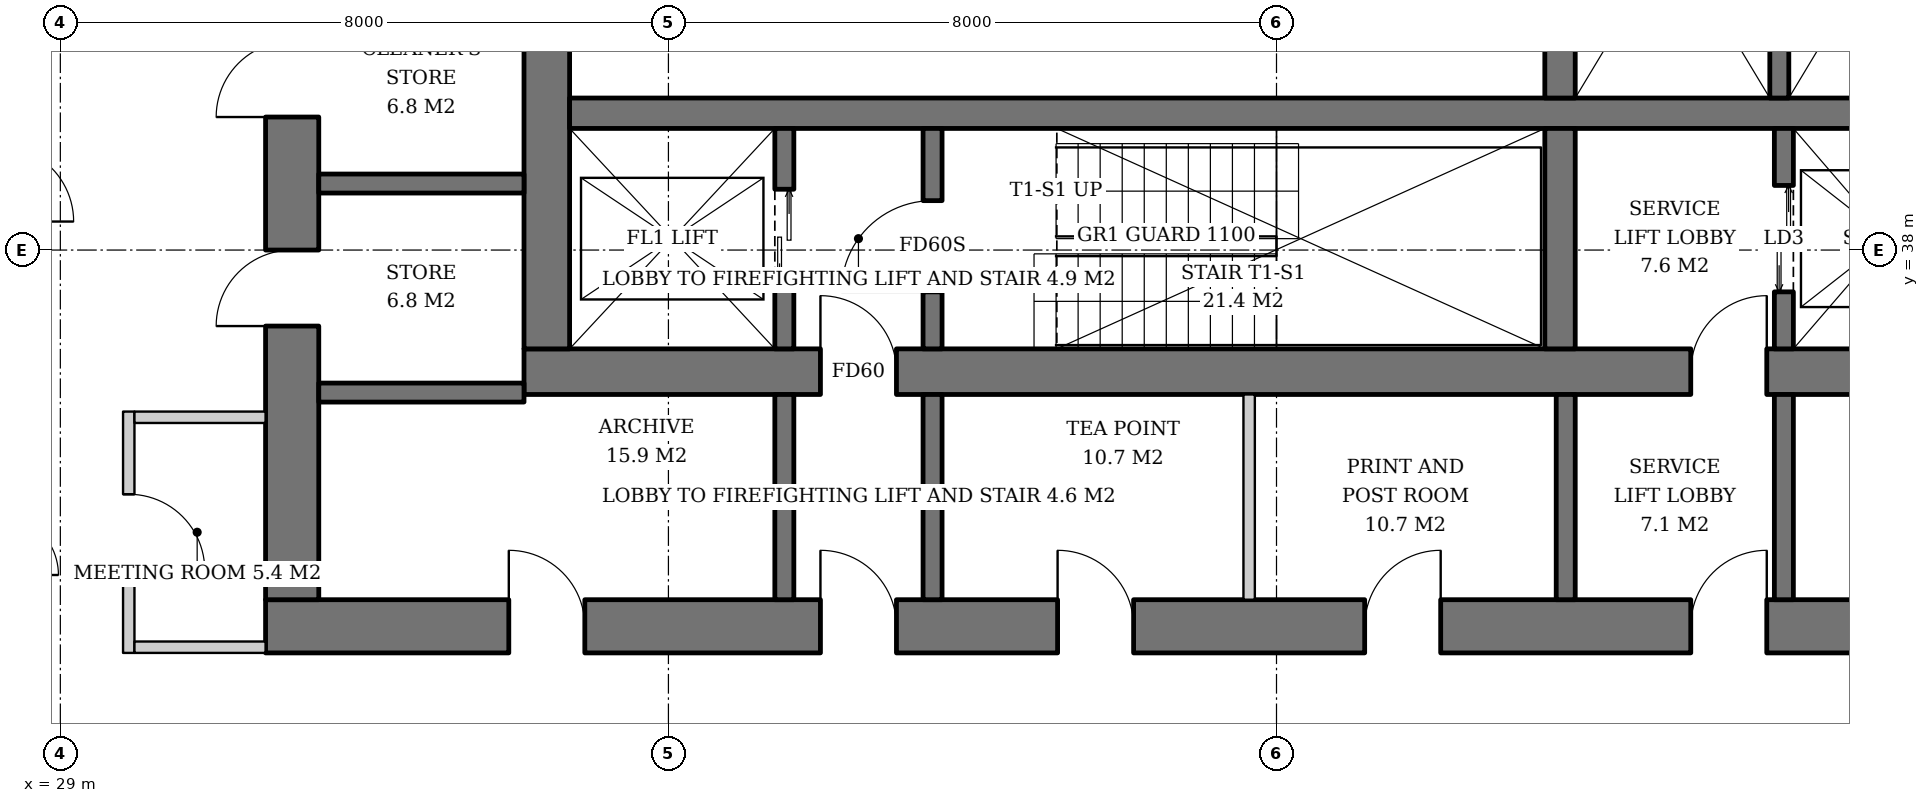
"""IFC4 building model, lengths in metres.
Left out: names, types, materials, properties, quantities, classifications, styles, units other than length and angle.
Written with IfcOpenShell. Run it as: python <this file> out.ifc"""

import sys

from ifc_helpers import new_model, si_unit, direction, frame, frame_2d, origin, place, context, subcontext, project, spatial, rectangle, extrude, element, fill, save


model = new_model("IFC4")
c1 = context("Model", 3, precision=1e-05, world=origin(), true_north=direction((0.0, 1.0)))
c2 = subcontext(c1, "Body", "Model", "MODEL_VIEW")
j1 = project(units=[si_unit("LENGTHUNIT", "METRE"), si_unit("PLANEANGLEUNIT", "RADIAN")], contexts=[c1])
p1 = place(None, origin())
s1 = spatial("IfcSite", under=j1, at=p1, CompositionType="ELEMENT")
p2 = place(p1, origin())
s2 = spatial("IfcBuilding", under=s1, at=p2, CompositionType="ELEMENT")
p3 = place(p2, frame((0.0, 0.0, 123.6)))
s3 = spatial("IfcBuildingStorey", under=s2, at=p3, CompositionType="ELEMENT", Elevation=123.6)
p4 = place(p3, frame((35.1, 36.4, 0.0), z_axis=(0.0, 0.0, 1.0), x_axis=(1.0, 0.0, 0.0)))
e1 = element("IfcWall", 1, at=p4, inside=s3, PredefinedType="SHEAR", context=c2, shape_type="SweptSolid", body=[
    extrude(rectangle(XDim=19.8, YDim=0.6, at=frame_2d((9.9, 0.0))), origin(), (0.0, 0.0, 1.0), 3.8),
])
p5 = place(p4, frame((3.9, 0.0, 0.0)))
e2 = element("IfcOpeningElement", 2, at=p5, cuts=e1, PredefinedType="OPENING", context=c2, shape_type="SweptSolid", body=[
    extrude(rectangle(XDim=1.0, YDim=2.1, at=frame_2d((0.5, 1.05))), frame((0.0, 0.31, 0.0), z_axis=(0.0, -1.0, 0.0), x_axis=(1.0, 0.0, 0.0)), (0.0, 0.0, 1.0), 0.62),
])
p6 = place(p4, frame((15.35, 0.0, 0.0)))
e3 = element("IfcOpeningElement", 3, at=p6, cuts=e1, PredefinedType="OPENING", context=c2, shape_type="SweptSolid", body=[
    extrude(rectangle(XDim=1.0, YDim=2.1, at=frame_2d((0.5, 1.05))), frame((0.0, 0.31, 0.0), z_axis=(0.0, -1.0, 0.0), x_axis=(1.0, 0.0, 0.0)), (0.0, 0.0, 1.0), 0.62),
])
p7 = place(p3, frame((35.4, 36.7, 0.0), z_axis=(0.0, 0.0, 1.0), x_axis=(0.0, 1.0, 0.0)))
e4 = element("IfcWall", 4, at=p7, inside=s3, PredefinedType="SHEAR", context=c2, shape_type="SweptSolid", body=[
    extrude(rectangle(XDim=18.6, YDim=0.6, at=frame_2d((9.3, 0.0))), origin(), (0.0, 0.0, 1.0), 3.8),
])
p8 = place(p7, frame((8.4, 0.0, 0.0)))
e5 = element("IfcOpeningElement", 5, at=p8, cuts=e4, PredefinedType="OPENING", context=c2, shape_type="SweptSolid", body=[
    extrude(rectangle(XDim=1.8, YDim=2.4, at=frame_2d((0.9, 1.2))), frame((0.0, 0.31, 0.0), z_axis=(0.0, -1.0, 0.0), x_axis=(1.0, 0.0, 0.0)), (0.0, 0.0, 1.0), 0.62),
])
p9 = place(p3, frame((31.7, 33.05, 0.0), z_axis=(0.0, 0.0, 1.0), x_axis=(1.0, 0.0, 0.0)))
e6 = element("IfcWall", 6, at=p9, inside=s3, PredefinedType="SHEAR", context=c2, shape_type="SweptSolid", body=[
    extrude(rectangle(XDim=26.6, YDim=0.7, at=frame_2d((13.3, 0.0))), origin(), (0.0, 0.0, 1.0), 3.8),
])
p10 = place(p9, frame((7.3, 0.0, 0.0)))
e7 = element("IfcOpeningElement", 7, at=p10, cuts=e6, PredefinedType="OPENING", context=c2, shape_type="SweptSolid", body=[
    extrude(rectangle(XDim=1.0, YDim=2.1, at=frame_2d((0.5, 1.05))), frame((0.0, 0.36, 0.0), z_axis=(0.0, -1.0, 0.0), x_axis=(1.0, 0.0, 0.0)), (0.0, 0.0, 1.0), 0.72),
])
p11 = place(p9, frame((18.75, 0.0, 0.0)))
e8 = element("IfcOpeningElement", 8, at=p11, cuts=e6, PredefinedType="OPENING", context=c2, shape_type="SweptSolid", body=[
    extrude(rectangle(XDim=1.0, YDim=2.1, at=frame_2d((0.5, 1.05))), frame((0.0, 0.36, 0.0), z_axis=(0.0, -1.0, 0.0), x_axis=(1.0, 0.0, 0.0)), (0.0, 0.0, 1.0), 0.72),
])
p12 = place(p9, frame((3.2, 0.0, 0.0)))
e9 = element("IfcOpeningElement", 9, at=p12, cuts=e6, PredefinedType="OPENING", context=c2, shape_type="SweptSolid", body=[
    extrude(rectangle(XDim=1.0, YDim=2.1, at=frame_2d((0.5, 1.05))), frame((0.0, 0.36, 0.0), z_axis=(0.0, -1.0, 0.0), x_axis=(1.0, 0.0, 0.0)), (0.0, 0.0, 1.0), 0.72),
])
p13 = place(p9, frame((10.42, 0.0, 0.0)))
e10 = element("IfcOpeningElement", 10, at=p13, cuts=e6, PredefinedType="OPENING", context=c2, shape_type="SweptSolid", body=[
    extrude(rectangle(XDim=1.0, YDim=2.1, at=frame_2d((0.5, 1.05))), frame((0.0, 0.36, 0.0), z_axis=(0.0, -1.0, 0.0), x_axis=(1.0, 0.0, 0.0)), (0.0, 0.0, 1.0), 0.72),
])
p14 = place(p9, frame((14.46, 0.0, 0.0)))
e11 = element("IfcOpeningElement", 11, at=p14, cuts=e6, PredefinedType="OPENING", context=c2, shape_type="SweptSolid", body=[
    extrude(rectangle(XDim=1.0, YDim=2.1, at=frame_2d((0.5, 1.05))), frame((0.0, 0.36, 0.0), z_axis=(0.0, -1.0, 0.0), x_axis=(1.0, 0.0, 0.0)), (0.0, 0.0, 1.0), 0.72),
])
p15 = place(p9, frame((22.5, 0.0, 0.0)))
e12 = element("IfcOpeningElement", 12, at=p15, cuts=e6, PredefinedType="OPENING", context=c2, shape_type="SweptSolid", body=[
    extrude(rectangle(XDim=1.0, YDim=2.1, at=frame_2d((0.5, 1.05))), frame((0.0, 0.36, 0.0), z_axis=(0.0, -1.0, 0.0), x_axis=(1.0, 0.0, 0.0)), (0.0, 0.0, 1.0), 0.72),
])
p16 = place(p3, frame((32.05, 33.4, 0.0), z_axis=(0.0, 0.0, 1.0), x_axis=(0.0, 1.0, 0.0)))
e13 = element("IfcWall", 13, at=p16, inside=s3, PredefinedType="SHEAR", context=c2, shape_type="SweptSolid", body=[
    extrude(rectangle(XDim=25.2, YDim=0.7, at=frame_2d((12.6, 0.0))), origin(), (0.0, 0.0, 1.0), 3.8),
])
p17 = place(p16, frame((11.7, 0.0, 0.0)))
e14 = element("IfcOpeningElement", 14, at=p17, cuts=e13, PredefinedType="OPENING", context=c2, shape_type="SweptSolid", body=[
    extrude(rectangle(XDim=1.8, YDim=2.4, at=frame_2d((0.9, 1.2))), frame((0.0, 0.36, 0.0), z_axis=(0.0, -1.0, 0.0), x_axis=(1.0, 0.0, 0.0)), (0.0, 0.0, 1.0), 0.72),
])
p18 = place(p16, frame((3.6, 0.0, 0.0)))
e15 = element("IfcOpeningElement", 15, at=p18, cuts=e13, PredefinedType="OPENING", context=c2, shape_type="SweptSolid", body=[
    extrude(rectangle(XDim=1.0, YDim=2.1, at=frame_2d((0.5, 1.05))), frame((0.0, 0.36, 0.0), z_axis=(0.0, -1.0, 0.0), x_axis=(1.0, 0.0, 0.0)), (0.0, 0.0, 1.0), 0.72),
])
p19 = place(p16, frame((6.35, 0.0, 0.0)))
e16 = element("IfcOpeningElement", 16, at=p19, cuts=e13, PredefinedType="OPENING", context=c2, shape_type="SweptSolid", body=[
    extrude(rectangle(XDim=1.0, YDim=2.1, at=frame_2d((0.5, 1.05))), frame((0.0, 0.36, 0.0), z_axis=(0.0, -1.0, 0.0), x_axis=(1.0, 0.0, 0.0)), (0.0, 0.0, 1.0), 0.72),
])
p20 = place(p16, frame((9.1, 0.0, 0.0)))
e17 = element("IfcOpeningElement", 17, at=p20, cuts=e13, PredefinedType="OPENING", context=c2, shape_type="SweptSolid", body=[
    extrude(rectangle(XDim=1.0, YDim=2.1, at=frame_2d((0.5, 1.05))), frame((0.0, 0.36, 0.0), z_axis=(0.0, -1.0, 0.0), x_axis=(1.0, 0.0, 0.0)), (0.0, 0.0, 1.0), 0.72),
])
p21 = place(p16, frame((15.1, 0.0, 0.0)))
e18 = element("IfcOpeningElement", 18, at=p21, cuts=e13, PredefinedType="OPENING", context=c2, shape_type="SweptSolid", body=[
    extrude(rectangle(XDim=1.0, YDim=2.1, at=frame_2d((0.5, 1.05))), frame((0.0, 0.36, 0.0), z_axis=(0.0, -1.0, 0.0), x_axis=(1.0, 0.0, 0.0)), (0.0, 0.0, 1.0), 0.72),
])
p22 = place(p16, frame((17.85, 0.0, 0.0)))
e19 = element("IfcOpeningElement", 19, at=p22, cuts=e13, PredefinedType="OPENING", context=c2, shape_type="SweptSolid", body=[
    extrude(rectangle(XDim=1.0, YDim=2.1, at=frame_2d((0.5, 1.05))), frame((0.0, 0.36, 0.0), z_axis=(0.0, -1.0, 0.0), x_axis=(1.0, 0.0, 0.0)), (0.0, 0.0, 1.0), 0.72),
])
p23 = place(p3, frame((35.7, 39.8, 0.0), z_axis=(0.0, 0.0, 1.0), x_axis=(1.0, 0.0, 0.0)))
e20 = element("IfcWall", 20, at=p23, inside=s3, PredefinedType="SHEAR", context=c2, shape_type="SweptSolid", body=[
    extrude(rectangle(XDim=18.6, YDim=0.4, at=frame_2d((9.3, 0.0))), origin(), (0.0, 0.0, 1.0), 3.8),
])
p24 = place(p3, frame((48.73, 36.7, 0.0), z_axis=(0.0, 0.0, 1.0), x_axis=(0.0, 1.0, 0.0)))
e21 = element("IfcWall", 21, at=p24, inside=s3, PredefinedType="SHEAR", context=c2, shape_type="SweptSolid", body=[
    extrude(rectangle(XDim=2.9, YDim=0.4, at=frame_2d((1.45, 0.0))), origin(), (0.0, 0.0, 1.0), 3.8),
])
p25 = place(p3, frame((48.73, 40.0, 0.0), z_axis=(0.0, 0.0, 1.0), x_axis=(0.0, 1.0, 0.0)))
e22 = element("IfcWall", 22, at=p25, inside=s3, PredefinedType="SHEAR", context=c2, shape_type="SweptSolid", body=[
    extrude(rectangle(XDim=12.0, YDim=0.4, at=frame_2d((6.0, 0.0))), origin(), (0.0, 0.0, 1.0), 3.8),
])
p26 = place(p3, frame((38.525, 36.7, 0.0), z_axis=(0.0, 0.0, 1.0), x_axis=(0.0, 1.0, 0.0)))
e23 = element("IfcWall", 23, at=p26, inside=s3, PredefinedType="SHEAR", context=c2, shape_type="SweptSolid", body=[
    extrude(rectangle(XDim=2.9, YDim=0.25, at=frame_2d((1.45, 0.0))), origin(), (0.0, 0.0, 1.0), 3.8),
])
p27 = place(p26, frame((0.8, 0.0, 0.0)))
e24 = element("IfcOpeningElement", 24, at=p27, cuts=e23, PredefinedType="OPENING", context=c2, shape_type="SweptSolid", body=[
    extrude(rectangle(XDim=1.3, YDim=2.2, at=frame_2d((0.65, 1.1))), frame((0.0, 0.135, 0.0), z_axis=(0.0, -1.0, 0.0), x_axis=(1.0, 0.0, 0.0)), (0.0, 0.0, 1.0), 0.27),
])
p28 = place(p3, frame((40.475, 36.7, 0.0), z_axis=(0.0, 0.0, 1.0), x_axis=(0.0, 1.0, 0.0)))
e25 = element("IfcWall", 25, at=p28, inside=s3, PredefinedType="SHEAR", context=c2, shape_type="SweptSolid", body=[
    extrude(rectangle(XDim=2.9, YDim=0.25, at=frame_2d((1.45, 0.0))), origin(), (0.0, 0.0, 1.0), 3.8),
])
p29 = place(p28, frame((0.75, 0.0, 0.0)))
e26 = element("IfcOpeningElement", 26, at=p29, cuts=e25, PredefinedType="OPENING", context=c2, shape_type="SweptSolid", body=[
    extrude(rectangle(XDim=1.2, YDim=2.1, at=frame_2d((0.6, 1.05))), frame((0.0, 0.135, 0.0), z_axis=(0.0, -1.0, 0.0), x_axis=(1.0, 0.0, 0.0)), (0.0, 0.0, 1.0), 0.27),
])
p30 = place(p3, frame((51.675, 36.7, 0.0), z_axis=(0.0, 0.0, 1.0), x_axis=(0.0, 1.0, 0.0)))
e27 = element("IfcWall", 27, at=p30, inside=s3, PredefinedType="SHEAR", context=c2, shape_type="SweptSolid", body=[
    extrude(rectangle(XDim=2.9, YDim=0.25, at=frame_2d((1.45, 0.0))), origin(), (0.0, 0.0, 1.0), 3.8),
])
p31 = place(p30, frame((0.75, 0.0, 0.0)))
e28 = element("IfcOpeningElement", 28, at=p31, cuts=e27, PredefinedType="OPENING", context=c2, shape_type="SweptSolid", body=[
    extrude(rectangle(XDim=1.4, YDim=2.4, at=frame_2d((0.7, 1.2))), frame((0.0, 0.135, 0.0), z_axis=(0.0, -1.0, 0.0), x_axis=(1.0, 0.0, 0.0)), (0.0, 0.0, 1.0), 0.27),
])
p32 = place(p3, frame((51.615, 44.25, 0.0), z_axis=(0.0, 0.0, 1.0), x_axis=(0.0, -1.0, 0.0)))
e29 = element("IfcWall", 29, at=p32, inside=s3, PredefinedType="SHEAR", context=c2, shape_type="SweptSolid", body=[
    extrude(rectangle(XDim=4.25, YDim=0.25, at=frame_2d((2.125, 0.0))), origin(), (0.0, 0.0, 1.0), 3.8),
])
for number, where, z_axis, x_axis in (
    (30, (32.4, 36.125, 0.0), (0.0, 0.0, 1.0), (1.0, 0.0, 0.0)),
    (31, (32.4, 38.875, 0.0), (0.0, 0.0, 1.0), (1.0, 0.0, 0.0)),
):
    element("IfcWall", number, at=place(p3, frame(where, z_axis=z_axis, x_axis=x_axis)), inside=s3, PredefinedType="SHEAR", context=c2, shape_type="SweptSolid", body=[
        extrude(rectangle(XDim=2.7, YDim=0.25, at=frame_2d((1.35, 0.0))), origin(), (0.0, 0.0, 1.0), 3.8),
    ])
for number, where, z_axis, x_axis in (
    (32, (38.525, 33.4, 0.0), (0.0, 0.0, 1.0), (0.0, 1.0, 0.0)),
    (33, (40.475, 33.4, 0.0), (0.0, 0.0, 1.0), (0.0, 1.0, 0.0)),
    (34, (48.805, 33.4, 0.0), (0.0, 0.0, 1.0), (0.0, 1.0, 0.0)),
    (35, (51.675, 33.4, 0.0), (0.0, 0.0, 1.0), (0.0, 1.0, 0.0)),
):
    element("IfcWall", number, at=place(p3, frame(where, z_axis=z_axis, x_axis=x_axis)), inside=s3, PredefinedType="SOLIDWALL", context=c2, shape_type="SweptSolid", body=[
        extrude(rectangle(XDim=2.7, YDim=0.25, at=frame_2d((1.35, 0.0))), origin(), (0.0, 0.0, 1.0), 3.62),
    ])
p33 = place(p3, frame((44.64, 33.4, 0.0), z_axis=(0.0, 0.0, 1.0), x_axis=(0.0, 1.0, 0.0)))
e36 = element("IfcWall", 36, at=p33, inside=s3, PredefinedType="SOLIDWALL", context=c2, shape_type="SweptSolid", body=[
    extrude(rectangle(XDim=2.7, YDim=0.15, at=frame_2d((1.35, 0.0))), origin(), (0.0, 0.0, 1.0), 3.62),
])
p34 = place(p3, frame((29.9, 35.875, 0.0), z_axis=(0.0, 0.0, 1.0), x_axis=(0.0, -1.0, 0.0)))
e37 = element("IfcWall", 37, at=p34, inside=s3, PredefinedType="PARTITIONING", context=c2, shape_type="SweptSolid", body=[
    extrude(rectangle(XDim=3.175, YDim=0.15, at=frame_2d((1.587, 0.0))), origin(), (0.0, 0.0, 1.0), 2.806),
])
p35 = place(p34, frame((1.087, 0.0, 0.0)))
e38 = element("IfcOpeningElement", 38, at=p35, cuts=e37, PredefinedType="OPENING", context=c2, shape_type="SweptSolid", body=[
    extrude(rectangle(XDim=1.0, YDim=2.1, at=frame_2d((0.5, 1.05))), frame((0.0, 0.085, 0.0), z_axis=(0.0, -1.0, 0.0), x_axis=(1.0, 0.0, 0.0)), (0.0, 0.0, 1.0), 0.17),
])
for number, where, z_axis, x_axis in (
    (39, (31.7, 35.8, 0.0), (0.0, 0.0, 1.0), (-1.0, 0.0, 0.0)),
    (40, (31.7, 32.775, 0.0), (0.0, 0.0, 1.0), (-1.0, 0.0, 0.0)),
):
    element("IfcWall", number, at=place(p3, frame(where, z_axis=z_axis, x_axis=x_axis)), inside=s3, PredefinedType="PARTITIONING", context=c2, shape_type="SweptSolid", body=[
        extrude(rectangle(XDim=1.725, YDim=0.15, at=frame_2d((0.862, 0.0))), origin(), (0.0, 0.0, 1.0), 3.62),
    ])
p36 = place(p27, origin())
e41 = element("IfcDoor", 41, at=p36, inside=s3, OperationType="DOUBLE_DOOR_SLIDING", PredefinedType="DOOR", context=c2, shape_type="SweptSolid", body=[
    extrude(rectangle(XDim=1.3, YDim=2.2, at=frame_2d((0.65, 1.1))), frame((0.0, 0.025, 0.0), z_axis=(0.0, -1.0, 0.0), x_axis=(1.0, 0.0, 0.0)), (0.0, 0.0, 1.0), 0.05),
])
fill(e24, e41)
p37 = place(p29, origin())
e42 = element("IfcDoor", 42, at=p37, inside=s3, OperationType="SINGLE_SWING_LEFT", PredefinedType="DOOR", context=c2, shape_type="SweptSolid", body=[
    extrude(rectangle(XDim=1.2, YDim=2.1, at=frame_2d((0.6, 1.05))), frame((0.0, 0.025, 0.0), z_axis=(0.0, -1.0, 0.0), x_axis=(1.0, 0.0, 0.0)), (0.0, 0.0, 1.0), 0.05),
])
fill(e26, e42)
p38 = place(p31, origin())
e43 = element("IfcDoor", 43, at=p38, inside=s3, OperationType="DOUBLE_DOOR_SLIDING", PredefinedType="DOOR", context=c2, shape_type="SweptSolid", body=[
    extrude(rectangle(XDim=1.4, YDim=2.4, at=frame_2d((0.7, 1.2))), frame((0.0, 0.025, 0.0), z_axis=(0.0, -1.0, 0.0), x_axis=(1.0, 0.0, 0.0)), (0.0, 0.0, 1.0), 0.05),
])
fill(e28, e43)
p39 = place(p5, origin())
e44 = element("IfcDoor", 44, at=p39, inside=s3, OperationType="SINGLE_SWING_LEFT", PredefinedType="DOOR", context=c2, shape_type="SweptSolid", body=[
    extrude(rectangle(XDim=1.0, YDim=2.1, at=frame_2d((0.5, 1.05))), frame((0.0, 0.025, 0.0), z_axis=(0.0, -1.0, 0.0), x_axis=(1.0, 0.0, 0.0)), (0.0, 0.0, 1.0), 0.05),
])
fill(e2, e44)
p40 = place(p6, origin())
e45 = element("IfcDoor", 45, at=p40, inside=s3, OperationType="SINGLE_SWING_RIGHT", PredefinedType="DOOR", context=c2, shape_type="SweptSolid", body=[
    extrude(rectangle(XDim=1.0, YDim=2.1, at=frame_2d((0.5, 1.05))), frame((0.0, 0.025, 0.0), z_axis=(0.0, -1.0, 0.0), x_axis=(1.0, 0.0, 0.0)), (0.0, 0.0, 1.0), 0.05),
])
fill(e3, e45)
p41 = place(p10, origin())
e46 = element("IfcDoor", 46, at=p41, inside=s3, OperationType="SINGLE_SWING_LEFT", PredefinedType="DOOR", context=c2, shape_type="SweptSolid", body=[
    extrude(rectangle(XDim=1.0, YDim=2.1, at=frame_2d((0.5, 1.05))), frame((0.0, 0.025, 0.0), z_axis=(0.0, -1.0, 0.0), x_axis=(1.0, 0.0, 0.0)), (0.0, 0.0, 1.0), 0.05),
])
fill(e7, e46)
p42 = place(p11, origin())
e47 = element("IfcDoor", 47, at=p42, inside=s3, OperationType="SINGLE_SWING_RIGHT", PredefinedType="DOOR", context=c2, shape_type="SweptSolid", body=[
    extrude(rectangle(XDim=1.0, YDim=2.1, at=frame_2d((0.5, 1.05))), frame((0.0, 0.025, 0.0), z_axis=(0.0, -1.0, 0.0), x_axis=(1.0, 0.0, 0.0)), (0.0, 0.0, 1.0), 0.05),
])
fill(e8, e47)
p43 = place(p18, origin())
e48 = element("IfcDoor", 48, at=p43, inside=s3, OperationType="SINGLE_SWING_LEFT", PredefinedType="DOOR", context=c2, shape_type="SweptSolid", body=[
    extrude(rectangle(XDim=1.0, YDim=2.1, at=frame_2d((0.5, 1.05))), frame((0.0, -0.29, 0.0), z_axis=(0.0, -1.0, 0.0), x_axis=(1.0, 0.0, 0.0)), (0.0, 0.0, 1.0), 0.05),
])
fill(e15, e48)
p44 = place(p19, origin())
e49 = element("IfcDoor", 49, at=p44, inside=s3, OperationType="SINGLE_SWING_LEFT", PredefinedType="DOOR", context=c2, shape_type="SweptSolid", body=[
    extrude(rectangle(XDim=1.0, YDim=2.1, at=frame_2d((0.5, 1.05))), frame((0.0, -0.29, 0.0), z_axis=(0.0, -1.0, 0.0), x_axis=(1.0, 0.0, 0.0)), (0.0, 0.0, 1.0), 0.05),
])
fill(e16, e49)
p45 = place(p12, origin())
e50 = element("IfcDoor", 50, at=p45, inside=s3, OperationType="SINGLE_SWING_LEFT", PredefinedType="DOOR", context=c2, shape_type="SweptSolid", body=[
    extrude(rectangle(XDim=1.0, YDim=2.1, at=frame_2d((0.5, 1.05))), frame((0.0, 0.34, 0.0), z_axis=(0.0, -1.0, 0.0), x_axis=(1.0, 0.0, 0.0)), (0.0, 0.0, 1.0), 0.05),
])
fill(e9, e50)
p46 = place(p13, origin())
e51 = element("IfcDoor", 51, at=p46, inside=s3, OperationType="SINGLE_SWING_LEFT", PredefinedType="DOOR", context=c2, shape_type="SweptSolid", body=[
    extrude(rectangle(XDim=1.0, YDim=2.1, at=frame_2d((0.5, 1.05))), frame((0.0, 0.34, 0.0), z_axis=(0.0, -1.0, 0.0), x_axis=(1.0, 0.0, 0.0)), (0.0, 0.0, 1.0), 0.05),
])
fill(e10, e51)
p47 = place(p14, origin())
e52 = element("IfcDoor", 52, at=p47, inside=s3, OperationType="SINGLE_SWING_RIGHT", PredefinedType="DOOR", context=c2, shape_type="SweptSolid", body=[
    extrude(rectangle(XDim=1.0, YDim=2.1, at=frame_2d((0.5, 1.05))), frame((0.0, 0.34, 0.0), z_axis=(0.0, -1.0, 0.0), x_axis=(1.0, 0.0, 0.0)), (0.0, 0.0, 1.0), 0.05),
])
fill(e11, e52)
p48 = place(p35, origin())
e53 = element("IfcDoor", 53, at=p48, inside=s3, OperationType="SINGLE_SWING_RIGHT", PredefinedType="DOOR", context=c2, shape_type="SweptSolid", body=[
    extrude(rectangle(XDim=1.0, YDim=2.1, at=frame_2d((0.5, 1.05))), frame((0.0, 0.025, 0.0), z_axis=(0.0, -1.0, 0.0), x_axis=(1.0, 0.0, 0.0)), (0.0, 0.0, 1.0), 0.05),
])
fill(e38, e53)
save(model, sys.argv[1])
